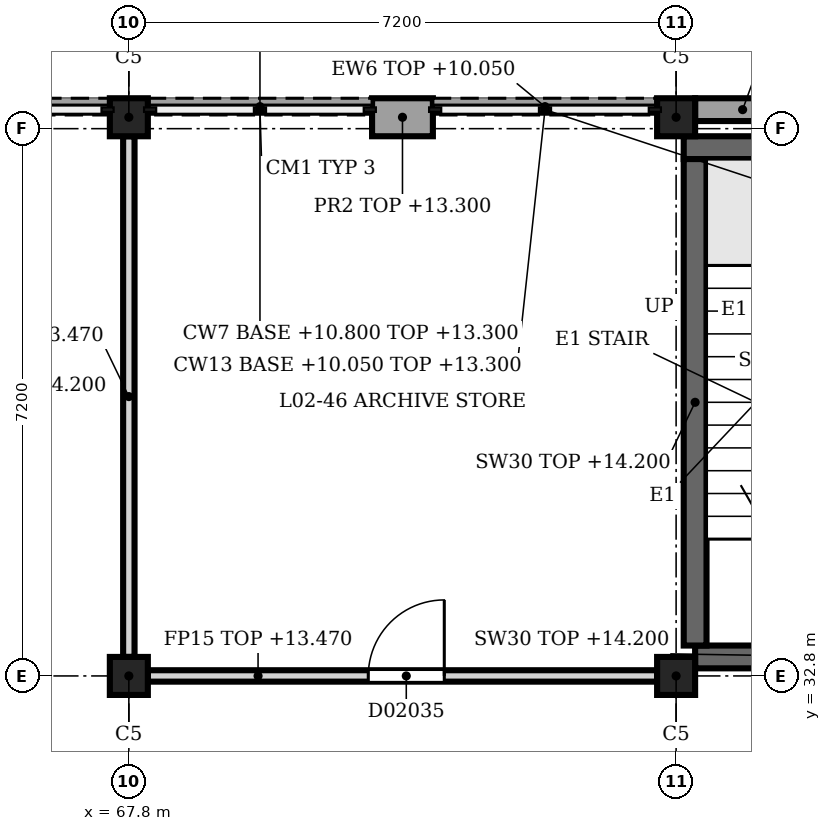
"""IFC4 building model, lengths in metres.
Left out: names, types, materials, properties, quantities, classifications, styles, units other than length and angle.
Written with IfcOpenShell. Run it as: python <this file> out.ifc"""

import sys

from ifc_helpers import new_model, si_unit, direction, frame, frame_2d, origin, origin_2d, place, context, subcontext, project, spatial, rectangle, extrude, element, fill, save


model = new_model("IFC4")
c1 = context("Model", 3, precision=1e-05, world=origin(), true_north=direction((0.0, 1.0)))
c2 = subcontext(c1, "Body", "Model", "MODEL_VIEW")
j1 = project(units=[si_unit("LENGTHUNIT", "METRE"), si_unit("PLANEANGLEUNIT", "RADIAN")], contexts=[c1])
p1 = place(None, origin())
s1 = spatial("IfcSite", under=j1, at=p1, CompositionType="ELEMENT")
p2 = place(p1, origin())
s2 = spatial("IfcBuilding", under=s1, at=p2, CompositionType="ELEMENT")
p3 = place(p2, frame((0.0, 0.0, 9.9)))
s3 = spatial("IfcBuildingStorey", under=s2, at=p3, CompositionType="ELEMENT", Elevation=9.9)
for number, where, z_axis, x_axis in (
    (1, (67.8, 32.8, 0.0), (0.0, 0.0, 1.0), (1.0, 0.0, 0.0)),
    (2, (67.8, 40.15, 0.0), (0.0, 0.0, 1.0), (1.0, 0.0, 0.0)),
    (3, (75.0, 32.8, 0.0), (0.0, 0.0, 1.0), (1.0, 0.0, 0.0)),
    (4, (75.0, 40.15, 0.0), (0.0, 0.0, 1.0), (1.0, 0.0, 0.0)),
):
    element("IfcColumn", number, at=place(p3, frame(where, z_axis=z_axis, x_axis=x_axis)), inside=s3, PredefinedType="COLUMN", context=c2, shape_type="SweptSolid", body=[
        extrude(rectangle(XDim=0.5, YDim=0.5, at=origin_2d()), origin(), (0.0, 0.0, 1.0), 4.5),
    ])
p4 = place(p3, frame((71.0, 40.15, 0.0), z_axis=(0.0, 0.0, 1.0), x_axis=(1.0, 0.0, 0.0)))
e5 = element("IfcWall", 5, at=p4, inside=s3, PredefinedType="SOLIDWALL", context=c2, shape_type="SweptSolid", body=[
    extrude(rectangle(XDim=0.8, YDim=0.5, at=frame_2d((0.4, 0.0))), origin(), (0.0, 0.0, 1.0), 3.4),
])
p5 = place(p3, frame((64.5, 40.29, 0.0), z_axis=(0.0, 0.0, 1.0), x_axis=(1.0, 0.0, 0.0)))
e6 = element("IfcWall", 6, at=p5, inside=s3, PredefinedType="SOLIDWALL", context=c2, shape_type="SweptSolid", body=[
    extrude(rectangle(XDim=3.05, YDim=0.22, at=frame_2d((1.525, 0.0))), origin(), (0.0, 0.0, 1.0), 0.9),
])
p6 = place(p3, frame((68.05, 40.29, 0.0), z_axis=(0.0, 0.0, 1.0), x_axis=(1.0, 0.0, 0.0)))
e7 = element("IfcWall", 7, at=p6, inside=s3, PredefinedType="SOLIDWALL", context=c2, shape_type="SweptSolid", body=[
    extrude(rectangle(XDim=2.95, YDim=0.22, at=frame_2d((1.475, 0.0))), origin(), (0.0, 0.0, 1.0), 0.9),
])
p7 = place(p3, frame((71.8, 40.29, 0.0), z_axis=(0.0, 0.0, 1.0), x_axis=(1.0, 0.0, 0.0)))
e8 = element("IfcWall", 8, at=p7, inside=s3, PredefinedType="SOLIDWALL", context=c2, shape_type="SweptSolid", body=[
    extrude(rectangle(XDim=2.95, YDim=0.22, at=frame_2d((1.475, 0.0))), origin(), (0.0, 0.0, 1.0), 0.15),
])
p8 = place(p3, frame((75.25, 40.25, 0.0), z_axis=(0.0, 0.0, 1.0), x_axis=(1.0, 0.0, 0.0)))
e9 = element("IfcWall", 9, at=p8, inside=s3, PredefinedType="SOLIDWALL", context=c2, shape_type="SweptSolid", body=[
    extrude(rectangle(XDim=2.95, YDim=0.3, at=frame_2d((1.475, 0.0))), origin(), (0.0, 0.0, 1.0), 3.4),
])
p9 = place(p8, frame((1.25, 0.0, 1.2)))
e10 = element("IfcOpeningElement", 10, at=p9, cuts=e9, PredefinedType="OPENING", context=c2, shape_type="SweptSolid", body=[
    extrude(rectangle(XDim=0.6, YDim=1.8, at=frame_2d((0.3, 0.9))), frame((0.0, 0.16, 0.0), z_axis=(0.0, -1.0, 0.0), x_axis=(1.0, 0.0, 0.0)), (0.0, 0.0, 1.0), 0.32),
])
p10 = place(p3, frame((75.25, 33.05, 0.0), z_axis=(0.0, 0.0, 1.0), x_axis=(1.0, 0.0, 0.0)))
e11 = element("IfcWall", 11, at=p10, inside=s3, PredefinedType="SHEAR", context=c2, shape_type="SweptSolid", body=[
    extrude(rectangle(XDim=6.575, YDim=0.3, at=frame_2d((3.288, 0.0))), origin(), (0.0, 0.0, 1.0), 4.3),
])
p11 = place(p10, frame((4.35, 0.0, 0.0)))
e12 = element("IfcOpeningElement", 12, at=p11, cuts=e11, PredefinedType="OPENING", context=c2, shape_type="SweptSolid", body=[
    extrude(rectangle(XDim=1.2, YDim=2.1, at=frame_2d((0.6, 1.05))), frame((0.0, 0.16, 0.0), z_axis=(0.0, -1.0, 0.0), x_axis=(1.0, 0.0, 0.0)), (0.0, 0.0, 1.0), 0.32),
])
p12 = place(p3, frame((75.1, 39.75, 0.0), z_axis=(0.0, 0.0, 1.0), x_axis=(1.0, 0.0, 0.0)))
e13 = element("IfcWall", 13, at=p12, inside=s3, PredefinedType="SHEAR", context=c2, shape_type="SweptSolid", body=[
    extrude(rectangle(XDim=7.0, YDim=0.3, at=frame_2d((3.5, 0.0))), origin(), (0.0, 0.0, 1.0), 4.3),
])
p13 = place(p12, frame((1.4, 0.0, 1.2)))
e14 = element("IfcOpeningElement", 14, at=p13, cuts=e13, PredefinedType="OPENING", context=c2, shape_type="SweptSolid", body=[
    extrude(rectangle(XDim=0.6, YDim=1.8, at=frame_2d((0.3, 0.9))), frame((0.0, 0.16, 0.0), z_axis=(0.0, -1.0, 0.0), x_axis=(1.0, 0.0, 0.0)), (0.0, 0.0, 1.0), 0.32),
])
p14 = place(p3, frame((75.25, 33.2, 0.0), z_axis=(0.0, 0.0, 1.0), x_axis=(0.0, 1.0, 0.0)))
e15 = element("IfcWall", 15, at=p14, inside=s3, PredefinedType="SHEAR", context=c2, shape_type="SweptSolid", body=[
    extrude(rectangle(XDim=6.4, YDim=0.3, at=frame_2d((3.2, 0.0))), origin(), (0.0, 0.0, 1.0), 4.3),
])
p15 = place(p3, frame((68.05, 32.8, 0.0), z_axis=(0.0, 0.0, 1.0), x_axis=(1.0, 0.0, 0.0)))
e16 = element("IfcWall", 16, at=p15, inside=s3, PredefinedType="PARTITIONING", context=c2, shape_type="SweptSolid", body=[
    extrude(rectangle(XDim=6.7, YDim=0.15, at=frame_2d((3.35, 0.0))), origin(), (0.0, 0.0, 1.0), 3.57),
])
p16 = place(p15, frame((2.9, 0.0, 0.0)))
e17 = element("IfcOpeningElement", 17, at=p16, cuts=e16, PredefinedType="OPENING", context=c2, shape_type="SweptSolid", body=[
    extrude(rectangle(XDim=1.0, YDim=2.1, at=frame_2d((0.5, 1.05))), frame((0.0, 0.085, 0.0), z_axis=(0.0, -1.0, 0.0), x_axis=(1.0, 0.0, 0.0)), (0.0, 0.0, 1.0), 0.17),
])
p17 = place(p3, frame((67.8, 33.05, 0.0), z_axis=(0.0, 0.0, 1.0), x_axis=(0.0, 1.0, 0.0)))
e18 = element("IfcWall", 18, at=p17, inside=s3, PredefinedType="PARTITIONING", context=c2, shape_type="SweptSolid", body=[
    extrude(rectangle(XDim=6.85, YDim=0.15, at=frame_2d((3.425, 0.0))), origin(), (0.0, 0.0, 1.0), 3.57),
])
p18 = place(p16, origin())
e19 = element("IfcDoor", 19, at=p18, inside=s3, OperationType="SINGLE_SWING_RIGHT", PredefinedType="DOOR", context=c2, shape_type="SweptSolid", body=[
    extrude(rectangle(XDim=1.0, YDim=2.1, at=frame_2d((0.5, 1.05))), frame((0.0, 0.025, 0.0), z_axis=(0.0, -1.0, 0.0), x_axis=(1.0, 0.0, 0.0)), (0.0, 0.0, 1.0), 0.05),
])
fill(e17, e19)
save(model, sys.argv[1])
